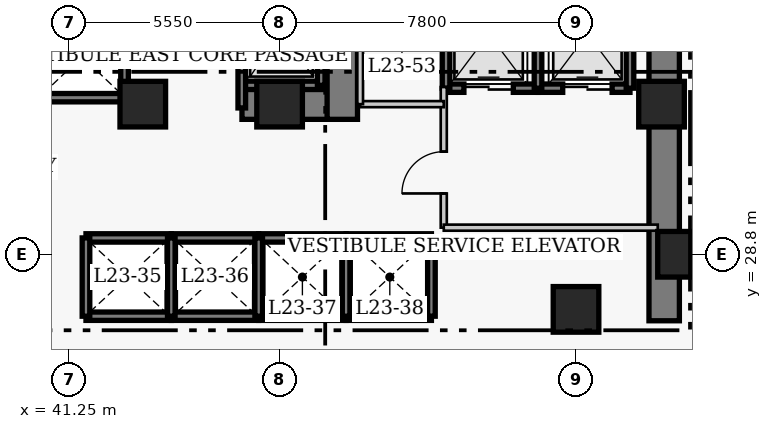
"""IFC4 building model, lengths in metres.
Left out: names, types, materials, properties, quantities, classifications, styles, units other than length and angle.
Written with IfcOpenShell. Run it as: python <this file> out.ifc"""

import sys

from ifc_helpers import new_model, si_unit, direction, frame, frame_2d, origin, origin_2d, place, context, subcontext, project, spatial, rectangle, extrude, element, fill, save


model = new_model("IFC4")
c1 = context("Model", 3, precision=1e-05, world=origin(), true_north=direction((0.0, 1.0)))
c2 = subcontext(c1, "Body", "Model", "MODEL_VIEW")
j1 = project(units=[si_unit("LENGTHUNIT", "METRE"), si_unit("PLANEANGLEUNIT", "RADIAN")], contexts=[c1])
p1 = place(None, origin())
s1 = spatial("IfcSite", under=j1, at=p1, CompositionType="ELEMENT")
p2 = place(p1, origin())
s2 = spatial("IfcBuilding", under=s1, at=p2, CompositionType="ELEMENT")
p3 = place(p2, frame((0.0, 0.0, 95.6)))
s3 = spatial("IfcBuildingStorey", under=s2, at=p3, CompositionType="ELEMENT", Elevation=95.6)
p4 = place(p3, frame((56.92, 27.05, 0.0), z_axis=(0.0, 0.0, 1.0), x_axis=(0.0, 1.0, 0.0)))
e1 = element("IfcWall", 1, at=p4, inside=s3, PredefinedType="SHEAR", context=c2, shape_type="SweptSolid", body=[
    extrude(rectangle(XDim=13.67, YDim=0.8, at=frame_2d((6.835, 0.0))), origin(), (0.0, 0.0, 1.0), 3.8),
])
p5 = place(p3, frame((45.81, 32.75, 0.0), z_axis=(0.0, 0.0, 1.0), x_axis=(1.0, 0.0, 0.0)))
e2 = element("IfcWall", 2, at=p5, inside=s3, PredefinedType="SHEAR", context=c2, shape_type="SweptSolid", body=[
    extrude(rectangle(XDim=2.64, YDim=0.8, at=frame_2d((1.32, 0.0))), origin(), (0.0, 0.0, 1.0), 3.8),
])
p6 = place(p3, frame((48.45, 32.35, 0.0), z_axis=(0.0, 0.0, 1.0), x_axis=(0.0, 1.0, 0.0)))
e3 = element("IfcWall", 3, at=p6, inside=s3, PredefinedType="SHEAR", context=c2, shape_type="SweptSolid", body=[
    extrude(rectangle(XDim=7.97, YDim=0.8, at=frame_2d((3.985, 0.0))), origin(), (0.0, 0.0, 1.0), 3.8),
])
p7 = place(p6, frame((5.85, 0.0, 0.0)))
e4 = element("IfcOpeningElement", 4, at=p7, cuts=e3, PredefinedType="OPENING", context=c2, shape_type="SweptSolid", body=[
    extrude(rectangle(XDim=1.1, YDim=2.15, at=frame_2d((0.55, 1.075))), frame((0.0, 0.41, 0.0), z_axis=(0.0, -1.0, 0.0), x_axis=(1.0, 0.0, 0.0)), (0.0, 0.0, 1.0), 0.82),
])
for number, where, z_axis, x_axis in (
    (5, (57.35, 28.8, 0.0), (0.0, 0.0, 1.0), (1.0, 0.0, 0.0)),
    (6, (43.2, 32.75, 0.0), (0.0, 0.0, 1.0), (1.0, 0.0, 0.0)),
    (7, (46.8, 32.75, 0.0), (0.0, 0.0, 1.0), (1.0, 0.0, 0.0)),
    (8, (54.6, 27.35, 0.0), (0.0, 0.0, 1.0), (1.0, 0.0, 0.0)),
    (9, (56.85, 32.75, 0.0), (0.0, 0.0, 1.0), (1.0, 0.0, 0.0)),
):
    element("IfcColumn", number, at=place(p3, frame(where, z_axis=z_axis, x_axis=x_axis)), inside=s3, PredefinedType="COLUMN", context=c2, shape_type="SweptSolid", body=[
        extrude(rectangle(XDim=1.2, YDim=1.2, at=origin_2d()), origin(), (0.0, 0.0, 1.0), 3.8),
    ])
for number, where, z_axis, x_axis in (
    (10, (41.705, 29.23, 0.0), (0.0, 0.0, 1.0), (1.0, 0.0, 0.0)),
    (11, (41.705, 27.17, 0.0), (0.0, 0.0, 1.0), (1.0, 0.0, 0.0)),
):
    element("IfcWall", number, at=place(p3, frame(where, z_axis=z_axis, x_axis=x_axis)), inside=s3, PredefinedType="SHEAR", context=c2, shape_type="SweptSolid", body=[
        extrude(rectangle(XDim=2.245, YDim=0.22, at=frame_2d((1.123, 0.0))), origin(), (0.0, 0.0, 1.0), 3.8),
    ])
p8 = place(p3, frame((41.705, 27.17, 0.0), z_axis=(0.0, 0.0, 1.0), x_axis=(0.0, 1.0, 0.0)))
e12 = element("IfcWall", 12, at=p8, inside=s3, PredefinedType="SHEAR", context=c2, shape_type="SweptSolid", body=[
    extrude(rectangle(XDim=2.06, YDim=0.2, at=frame_2d((1.03, 0.0))), origin(), (0.0, 0.0, 1.0), 3.8),
])
for number, where, z_axis, x_axis in (
    (13, (43.95, 29.23, 0.0), (0.0, 0.0, 1.0), (1.0, 0.0, 0.0)),
    (14, (43.95, 27.17, 0.0), (0.0, 0.0, 1.0), (1.0, 0.0, 0.0)),
):
    element("IfcWall", number, at=place(p3, frame(where, z_axis=z_axis, x_axis=x_axis)), inside=s3, PredefinedType="SHEAR", context=c2, shape_type="SweptSolid", body=[
        extrude(rectangle(XDim=2.3, YDim=0.22, at=frame_2d((1.15, 0.0))), origin(), (0.0, 0.0, 1.0), 3.8),
    ])
p9 = place(p3, frame((43.95, 27.17, 0.0), z_axis=(0.0, 0.0, 1.0), x_axis=(0.0, 1.0, 0.0)))
e15 = element("IfcWall", 15, at=p9, inside=s3, PredefinedType="SHEAR", context=c2, shape_type="SweptSolid", body=[
    extrude(rectangle(XDim=2.06, YDim=0.2, at=frame_2d((1.03, 0.0))), origin(), (0.0, 0.0, 1.0), 3.8),
])
for number, where, z_axis, x_axis in (
    (16, (46.25, 29.23, 0.0), (0.0, 0.0, 1.0), (1.0, 0.0, 0.0)),
    (17, (46.25, 27.17, 0.0), (0.0, 0.0, 1.0), (1.0, 0.0, 0.0)),
):
    element("IfcWall", number, at=place(p3, frame(where, z_axis=z_axis, x_axis=x_axis)), inside=s3, PredefinedType="SHEAR", context=c2, shape_type="SweptSolid", body=[
        extrude(rectangle(XDim=2.3, YDim=0.22, at=frame_2d((1.15, 0.0))), origin(), (0.0, 0.0, 1.0), 3.8),
    ])
p10 = place(p3, frame((46.25, 27.17, 0.0), z_axis=(0.0, 0.0, 1.0), x_axis=(0.0, 1.0, 0.0)))
e18 = element("IfcWall", 18, at=p10, inside=s3, PredefinedType="SHEAR", context=c2, shape_type="SweptSolid", body=[
    extrude(rectangle(XDim=2.06, YDim=0.2, at=frame_2d((1.03, 0.0))), origin(), (0.0, 0.0, 1.0), 3.8),
])
for number, where, z_axis, x_axis in (
    (19, (48.55, 29.23, 0.0), (0.0, 0.0, 1.0), (1.0, 0.0, 0.0)),
    (20, (48.55, 27.17, 0.0), (0.0, 0.0, 1.0), (1.0, 0.0, 0.0)),
):
    element("IfcWall", number, at=place(p3, frame(where, z_axis=z_axis, x_axis=x_axis)), inside=s3, PredefinedType="SHEAR", context=c2, shape_type="SweptSolid", body=[
        extrude(rectangle(XDim=2.245, YDim=0.22, at=frame_2d((1.123, 0.0))), origin(), (0.0, 0.0, 1.0), 3.8),
    ])
for number, where, z_axis, x_axis in (
    (21, (48.55, 27.17, 0.0), (0.0, 0.0, 1.0), (0.0, 1.0, 0.0)),
    (22, (50.795, 27.17, 0.0), (0.0, 0.0, 1.0), (0.0, 1.0, 0.0)),
):
    element("IfcWall", number, at=place(p3, frame(where, z_axis=z_axis, x_axis=x_axis)), inside=s3, PredefinedType="SHEAR", context=c2, shape_type="SweptSolid", body=[
        extrude(rectangle(XDim=2.06, YDim=0.2, at=frame_2d((1.03, 0.0))), origin(), (0.0, 0.0, 1.0), 3.8),
    ])
p11 = place(p3, frame((40.4, 32.92, 0.0), z_axis=(0.0, 0.0, 1.0), x_axis=(1.0, 0.0, 0.0)))
e23 = element("IfcWall", 23, at=p11, inside=s3, PredefinedType="SHEAR", context=c2, shape_type="SweptSolid", body=[
    extrude(rectangle(XDim=2.32, YDim=0.22, at=frame_2d((1.16, 0.0))), origin(), (0.0, 0.0, 1.0), 3.8),
])
p12 = place(p3, frame((42.72, 32.92, 0.0), z_axis=(0.0, 0.0, 1.0), x_axis=(0.0, 1.0, 0.0)))
e24 = element("IfcWall", 24, at=p12, inside=s3, PredefinedType="SHEAR", context=c2, shape_type="SweptSolid", body=[
    extrude(rectangle(XDim=2.16, YDim=0.2, at=frame_2d((1.08, 0.0))), origin(), (0.0, 0.0, 1.0), 3.8),
])
p13 = place(p3, frame((51.18, 33.17, 0.0), z_axis=(0.0, 0.0, 1.0), x_axis=(1.0, 0.0, 0.0)))
e25 = element("IfcWall", 25, at=p13, inside=s3, PredefinedType="SHEAR", context=c2, shape_type="SweptSolid", body=[
    extrude(rectangle(XDim=2.42, YDim=0.22, at=frame_2d((1.21, 0.0))), origin(), (0.0, 0.0, 1.0), 3.8),
])
p14 = place(p13, frame((0.47, 0.0, 0.0)))
e26 = element("IfcOpeningElement", 26, at=p14, cuts=e25, PredefinedType="OPENING", context=c2, shape_type="SweptSolid", body=[
    extrude(rectangle(XDim=1.3, YDim=2.15, at=frame_2d((0.65, 1.075))), frame((0.0, 0.12, 0.0), z_axis=(0.0, -1.0, 0.0), x_axis=(1.0, 0.0, 0.0)), (0.0, 0.0, 1.0), 0.24),
])
p15 = place(p3, frame((51.18, 33.17, 0.0), z_axis=(0.0, 0.0, 1.0), x_axis=(0.0, 1.0, 0.0)))
e27 = element("IfcWall", 27, at=p15, inside=s3, PredefinedType="SHEAR", context=c2, shape_type="SweptSolid", body=[
    extrude(rectangle(XDim=2.86, YDim=0.2, at=frame_2d((1.43, 0.0))), origin(), (0.0, 0.0, 1.0), 3.8),
])
p16 = place(p3, frame((53.6, 33.17, 0.0), z_axis=(0.0, 0.0, 1.0), x_axis=(1.0, 0.0, 0.0)))
e28 = element("IfcWall", 28, at=p16, inside=s3, PredefinedType="SHEAR", context=c2, shape_type="SweptSolid", body=[
    extrude(rectangle(XDim=2.42, YDim=0.22, at=frame_2d((1.21, 0.0))), origin(), (0.0, 0.0, 1.0), 3.8),
])
p17 = place(p16, frame((0.65, 0.0, 0.0)))
e29 = element("IfcOpeningElement", 29, at=p17, cuts=e28, PredefinedType="OPENING", context=c2, shape_type="SweptSolid", body=[
    extrude(rectangle(XDim=1.3, YDim=2.15, at=frame_2d((0.65, 1.075))), frame((0.0, 0.12, 0.0), z_axis=(0.0, -1.0, 0.0), x_axis=(1.0, 0.0, 0.0)), (0.0, 0.0, 1.0), 0.24),
])
for number, where, z_axis, x_axis in (
    (30, (53.6, 33.17, 0.0), (0.0, 0.0, 1.0), (0.0, 1.0, 0.0)),
    (31, (56.02, 33.17, 0.0), (0.0, 0.0, 1.0), (0.0, 1.0, 0.0)),
):
    element("IfcWall", number, at=place(p3, frame(where, z_axis=z_axis, x_axis=x_axis)), inside=s3, PredefinedType="SHEAR", context=c2, shape_type="SweptSolid", body=[
        extrude(rectangle(XDim=2.86, YDim=0.2, at=frame_2d((1.43, 0.0))), origin(), (0.0, 0.0, 1.0), 3.8),
    ])
p18 = place(p3, frame((45.805, 33.245, 0.0), z_axis=(0.0, 0.0, 1.0), x_axis=(1.0, 0.0, 0.0)))
e32 = element("IfcWall", 32, at=p18, inside=s3, PredefinedType="SHEAR", context=c2, shape_type="SweptSolid", body=[
    extrude(rectangle(XDim=2.09, YDim=0.22, at=frame_2d((1.045, 0.0))), origin(), (0.0, 0.0, 1.0), 3.8),
])
p19 = place(p3, frame((45.805, 32.65, 0.0), z_axis=(0.0, 0.0, 1.0), x_axis=(0.0, 1.0, 0.0)))
e33 = element("IfcWall", 33, at=p19, inside=s3, PredefinedType="SHEAR", context=c2, shape_type="SweptSolid", body=[
    extrude(rectangle(XDim=3.505, YDim=0.2, at=frame_2d((1.752, 0.0))), origin(), (0.0, 0.0, 1.0), 3.8),
])
p20 = place(p3, frame((47.895, 33.245, 0.0), z_axis=(0.0, 0.0, 1.0), x_axis=(0.0, 1.0, 0.0)))
e34 = element("IfcWall", 34, at=p20, inside=s3, PredefinedType="SHEAR", context=c2, shape_type="SweptSolid", body=[
    extrude(rectangle(XDim=2.91, YDim=0.2, at=frame_2d((1.455, 0.0))), origin(), (0.0, 0.0, 1.0), 3.8),
])
p21 = place(p3, frame((51.12, 29.5, 0.0), z_axis=(0.0, 0.0, 1.0), x_axis=(0.0, 1.0, 0.0)))
e35 = element("IfcWall", 35, at=p21, inside=s3, PredefinedType="PARTITIONING", context=c2, shape_type="SweptSolid", body=[
    extrude(rectangle(XDim=3.7, YDim=0.16, at=frame_2d((1.85, 0.0))), origin(), (0.0, 0.0, 1.0), 3.54),
])
p22 = place(p21, frame((0.9, 0.0, 0.0)))
e36 = element("IfcOpeningElement", 36, at=p22, cuts=e35, PredefinedType="OPENING", context=c2, shape_type="SweptSolid", body=[
    extrude(rectangle(XDim=1.1, YDim=2.15, at=frame_2d((0.55, 1.075))), frame((0.0, 0.09, 0.0), z_axis=(0.0, -1.0, 0.0), x_axis=(1.0, 0.0, 0.0)), (0.0, 0.0, 1.0), 0.18),
])
p23 = place(p3, frame((51.12, 29.5, 0.0), z_axis=(0.0, 0.0, 1.0), x_axis=(1.0, 0.0, 0.0)))
e37 = element("IfcWall", 37, at=p23, inside=s3, PredefinedType="PARTITIONING", context=c2, shape_type="SweptSolid", body=[
    extrude(rectangle(XDim=5.63, YDim=0.16, at=frame_2d((2.815, 0.0))), origin(), (0.0, 0.0, 1.0), 3.54),
])
p24 = place(p3, frame((48.92, 32.75, 0.0), z_axis=(0.0, 0.0, 1.0), x_axis=(1.0, 0.0, 0.0)))
e38 = element("IfcWall", 38, at=p24, inside=s3, PredefinedType="PARTITIONING", context=c2, shape_type="SweptSolid", body=[
    extrude(rectangle(XDim=2.2, YDim=0.16, at=frame_2d((1.1, 0.0))), origin(), (0.0, 0.0, 1.0), 3.54),
])
p25 = place(p3, frame((48.92, 32.75, 0.0), z_axis=(0.0, 0.0, 1.0), x_axis=(0.0, 1.0, 0.0)))
e39 = element("IfcWall", 39, at=p25, inside=s3, PredefinedType="PARTITIONING", context=c2, shape_type="SweptSolid", body=[
    extrude(rectangle(XDim=3.62, YDim=0.15, at=frame_2d((1.81, 0.0))), origin(), (0.0, 0.0, 1.0), 3.54),
])
p26 = place(p14, origin())
e40 = element("IfcDoor", 40, at=p26, inside=s3, OperationType="DOUBLE_DOOR_SLIDING", PredefinedType="DOOR", context=c2, shape_type="SweptSolid", body=[
    extrude(rectangle(XDim=1.3, YDim=2.15, at=frame_2d((0.65, 1.075))), frame((0.0, 0.025, 0.0), z_axis=(0.0, -1.0, 0.0), x_axis=(1.0, 0.0, 0.0)), (0.0, 0.0, 1.0), 0.05),
])
fill(e26, e40)
p27 = place(p17, origin())
e41 = element("IfcDoor", 41, at=p27, inside=s3, OperationType="DOUBLE_DOOR_SLIDING", PredefinedType="DOOR", context=c2, shape_type="SweptSolid", body=[
    extrude(rectangle(XDim=1.3, YDim=2.15, at=frame_2d((0.65, 1.075))), frame((0.0, 0.025, 0.0), z_axis=(0.0, -1.0, 0.0), x_axis=(1.0, 0.0, 0.0)), (0.0, 0.0, 1.0), 0.05),
])
fill(e29, e41)
p28 = place(p22, origin())
e42 = element("IfcDoor", 42, at=p28, inside=s3, OperationType="SINGLE_SWING_LEFT", PredefinedType="DOOR", context=c2, shape_type="SweptSolid", body=[
    extrude(rectangle(XDim=1.1, YDim=2.15, at=frame_2d((0.55, 1.075))), frame((0.0, 0.025, 0.0), z_axis=(0.0, -1.0, 0.0), x_axis=(1.0, 0.0, 0.0)), (0.0, 0.0, 1.0), 0.05),
])
fill(e36, e42)
save(model, sys.argv[1])
